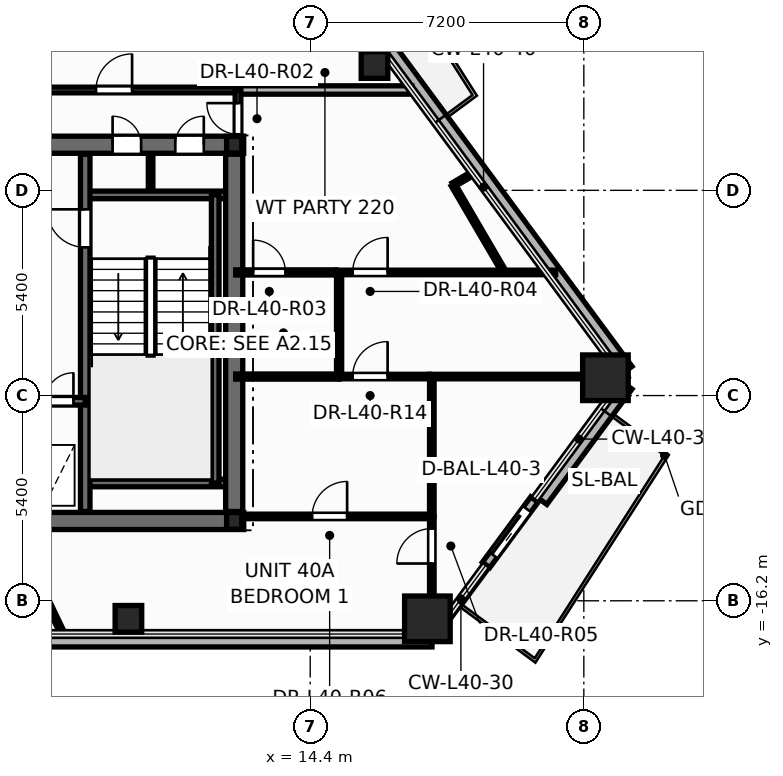
"""IFC4 building model, lengths in metres.
Left out: names, types, materials, properties, quantities, classifications, styles, units other than length and angle.
Written with IfcOpenShell. Run it as: python <this file> out.ifc"""

import sys

from ifc_helpers import new_model, si_unit, direction, frame, frame_2d, origin, origin_2d, place, context, subcontext, project, spatial, rectangle, hollow_rectangle, hollow_circle, i_section, extrude, element, fill, save


model = new_model("IFC4")
c1 = context("Model", 3, precision=1e-05, world=origin(), true_north=direction((0.0, 1.0)))
c2 = subcontext(c1, "Body", "Model", "MODEL_VIEW")
j1 = project(units=[si_unit("LENGTHUNIT", "METRE"), si_unit("PLANEANGLEUNIT", "RADIAN")], contexts=[c1])
p1 = place(None, origin())
s1 = spatial("IfcSite", under=j1, at=p1, CompositionType="ELEMENT")
p2 = place(p1, origin())
s2 = spatial("IfcBuilding", under=s1, at=p2, CompositionType="ELEMENT")
p3 = place(p2, frame((0.0, 0.0, 154.5)))
s3 = spatial("IfcBuildingStorey", under=s2, at=p3, CompositionType="ELEMENT", Elevation=154.5)
for number, where, z_axis, x_axis in (
    (1, (17.484, -16.674, 0.0), (0.0, 0.0, 1.0), (1.0, 0.0, 0.0)),
    (2, (22.168, -10.331, 0.0), (0.0, 0.0, 1.0), (1.0, 0.0, 0.0)),
):
    element("IfcColumn", number, at=place(p3, frame(where, z_axis=z_axis, x_axis=x_axis)), inside=s3, PredefinedType="COLUMN", context=c2, shape_type="SweptSolid", body=[
        extrude(hollow_rectangle(XDim=1.2, YDim=1.2, WallThickness=0.055, at=origin_2d()), origin(), (0.0, 0.0, 1.0), 3.6),
    ])
for number, where, z_axis, x_axis in (
    (3, (9.616, -16.674, 0.0), (0.0, 0.0, 1.0), (1.0, 0.0, 0.0)),
    (4, (16.092, -2.103, 0.0), (0.0, 0.0, 1.0), (1.0, 0.0, 0.0)),
):
    element("IfcColumn", number, at=place(p3, frame(where, z_axis=z_axis, x_axis=x_axis)), inside=s3, PredefinedType="COLUMN", context=c2, shape_type="SweptSolid", body=[
        extrude(hollow_circle(Radius=0.35, WallThickness=0.03, at=origin_2d()), origin(), (0.0, 0.0, 1.0), 3.6),
    ])
for number, where, z_axis, x_axis in (
    (5, (12.4, -14.1, 0.0), (0.0, 0.0, 1.0), (1.0, 0.0, 0.0)),
    (6, (12.4, -4.2, 0.0), (0.0, 0.0, 1.0), (1.0, 0.0, 0.0)),
):
    element("IfcColumn", number, at=place(p3, frame(where, z_axis=z_axis, x_axis=x_axis)), inside=s3, PredefinedType="COLUMN", context=c2, shape_type="SweptSolid", body=[
        extrude(i_section(OverallWidth=0.4, OverallDepth=0.44, WebThickness=0.028, FlangeThickness=0.04, at=origin_2d()), origin(), (0.0, 0.0, 1.0), 3.6),
    ])
p4 = place(p3, frame((-17.605, -17.234, -0.2), z_axis=(0.0, 0.0, 1.0), x_axis=(1.0, 0.0, 0.0)))
e7 = element("IfcWall", 7, at=p4, inside=s3, PredefinedType="PARAPET", context=c2, shape_type="SweptSolid", body=[
    extrude(rectangle(XDim=35.211, YDim=0.36, at=frame_2d((17.605, 0.0))), origin(), (0.0, 0.0, 1.0), 0.38),
])
p5 = place(p3, frame((20.482, -13.558, -0.2), z_axis=(0.0, 0.0, 1.0), x_axis=(0.59405075876, 0.804427557967, 0.0)))
e8 = element("IfcWall", 8, at=p5, inside=s3, PredefinedType="PARAPET", context=c2, shape_type="SweptSolid", body=[
    extrude(rectangle(XDim=3.773, YDim=0.36, at=frame_2d((1.886, 0.0))), origin(), (0.0, 0.0, 1.0), 0.38),
])
p6 = place(p3, frame((22.723, -10.14, -0.2), z_axis=(0.0, 0.0, 1.0), x_axis=(-0.59407502275, 0.804409639017, 0.0)))
e9 = element("IfcWall", 9, at=p6, inside=s3, PredefinedType="PARAPET", context=c2, shape_type="SweptSolid", body=[
    extrude(rectangle(XDim=12.23, YDim=0.36, at=frame_2d((6.115, 0.0))), origin(), (0.0, 0.0, 1.0), 0.38),
])
p7 = place(p3, frame((19.028, -15.256, -0.015), z_axis=(0.0, 0.0, 1.0), x_axis=(0.594124797079, 0.804372877151, 0.0)))
e10 = element("IfcWall", 10, at=p7, inside=s3, PredefinedType="STANDARD", context=c2, shape_type="SweptSolid", body=[
    extrude(rectangle(XDim=2.14, YDim=0.24, at=frame_2d((1.07, 0.0))), origin(), (0.0, 0.0, 1.0), 2.807),
])
p8 = place(p7, frame((0.32, 0.0, 0.015)))
e11 = element("IfcOpeningElement", 11, at=p8, cuts=e10, PredefinedType="OPENING", context=c2, shape_type="SweptSolid", body=[
    extrude(rectangle(XDim=1.506, YDim=2.204, at=frame_2d((0.75, 1.102))), frame((0.0, 0.13, 0.0), z_axis=(0.0, -1.0, 0.0), x_axis=(1.0, 0.0, 0.0)), (0.0, 0.0, 1.0), 0.26),
])
p9 = place(p3, frame((10.2, -5.52, 0.0), z_axis=(0.0, 0.0, 1.0), x_axis=(0.0, 1.0, 0.0)))
e12 = element("IfcWall", 12, at=p9, inside=s3, PredefinedType="PARTITIONING", context=c2, shape_type="SweptSolid", body=[
    extrude(rectangle(XDim=1.12, YDim=0.12, at=frame_2d((0.56, 0.0))), origin(), (0.0, 0.0, 1.0), 3.35),
])
p10 = place(p3, frame((-12.65, -14.1, 0.0), z_axis=(0.0, 0.0, 1.0), x_axis=(1.0, 0.0, 0.0)))
e13 = element("IfcWall", 13, at=p10, inside=s3, PredefinedType="SHEAR", context=c2, shape_type="SweptSolid", body=[
    extrude(rectangle(XDim=25.3, YDim=0.45, at=frame_2d((12.65, 0.0))), origin(), (0.0, 0.0, 1.0), 3.6),
])
p11 = place(p3, frame((-12.65, -4.2, 0.0), z_axis=(0.0, 0.0, 1.0), x_axis=(1.0, 0.0, 0.0)))
e14 = element("IfcWall", 14, at=p11, inside=s3, PredefinedType="SHEAR", context=c2, shape_type="SweptSolid", body=[
    extrude(rectangle(XDim=25.3, YDim=0.45, at=frame_2d((12.65, 0.0))), origin(), (0.0, 0.0, 1.0), 3.6),
])
p12 = place(p11, frame((1.85, 0.0, 0.0)))
e15 = element("IfcOpeningElement", 15, at=p12, cuts=e14, PredefinedType="OPENING", context=c2, shape_type="SweptSolid", body=[
    extrude(rectangle(XDim=0.756, YDim=2.054, at=frame_2d((0.375, 1.027))), frame((0.0, 0.235, 0.0), z_axis=(0.0, -1.0, 0.0), x_axis=(1.0, 0.0, 0.0)), (0.0, 0.0, 1.0), 0.47),
])
p13 = place(p11, frame((21.85, 0.0, 0.0)))
e16 = element("IfcOpeningElement", 16, at=p13, cuts=e14, PredefinedType="OPENING", context=c2, shape_type="SweptSolid", body=[
    extrude(rectangle(XDim=0.756, YDim=2.054, at=frame_2d((0.375, 1.027))), frame((0.0, 0.235, 0.0), z_axis=(0.0, -1.0, 0.0), x_axis=(1.0, 0.0, 0.0)), (0.0, 0.0, 1.0), 0.47),
])
p14 = place(p11, frame((23.5, 0.0, 0.0)))
e17 = element("IfcOpeningElement", 17, at=p14, cuts=e14, PredefinedType="OPENING", context=c2, shape_type="SweptSolid", body=[
    extrude(rectangle(XDim=0.756, YDim=2.054, at=frame_2d((0.375, 1.027))), frame((0.0, 0.235, 0.0), z_axis=(0.0, -1.0, 0.0), x_axis=(1.0, 0.0, 0.0)), (0.0, 0.0, 1.0), 0.47),
])
p15 = place(p11, frame((5.85, 0.0, 0.0)))
e18 = element("IfcOpeningElement", 18, at=p15, cuts=e14, PredefinedType="OPENING", context=c2, shape_type="SweptSolid", body=[
    extrude(rectangle(XDim=1.006, YDim=2.104, at=frame_2d((0.5, 1.052))), frame((0.0, 0.235, 0.0), z_axis=(0.0, -1.0, 0.0), x_axis=(1.0, 0.0, 0.0)), (0.0, 0.0, 1.0), 0.47),
])
p16 = place(p11, frame((10.35, 0.0, 0.0)))
e19 = element("IfcOpeningElement", 19, at=p16, cuts=e14, PredefinedType="OPENING", context=c2, shape_type="SweptSolid", body=[
    extrude(rectangle(XDim=1.406, YDim=2.154, at=frame_2d((0.7, 1.077))), frame((0.0, 0.235, 0.0), z_axis=(0.0, -1.0, 0.0), x_axis=(1.0, 0.0, 0.0)), (0.0, 0.0, 1.0), 0.47),
])
p17 = place(p11, frame((18.45, 0.0, 0.0)))
e20 = element("IfcOpeningElement", 20, at=p17, cuts=e14, PredefinedType="OPENING", context=c2, shape_type="SweptSolid", body=[
    extrude(rectangle(XDim=1.006, YDim=2.104, at=frame_2d((0.5, 1.052))), frame((0.0, 0.235, 0.0), z_axis=(0.0, -1.0, 0.0), x_axis=(1.0, 0.0, 0.0)), (0.0, 0.0, 1.0), 0.47),
])
for number, where, z_axis, x_axis in (
    (21, (8.48, -5.52, 0.0), (0.0, 0.0, 1.0), (1.0, 0.0, 0.0)),
    (22, (8.48, -13.1, 0.0), (0.0, 0.0, 1.0), (1.0, 0.0, 0.0)),
):
    element("IfcWall", number, at=place(p3, frame(where, z_axis=z_axis, x_axis=x_axis)), inside=s3, PredefinedType="SOLIDWALL", context=c2, shape_type="SweptSolid", body=[
        extrude(rectangle(XDim=3.87, YDim=0.2, at=frame_2d((1.935, 0.0))), origin(), (0.0, 0.0, 1.0), 3.6),
    ])
p18 = place(p3, frame((11.9, -13.1, 0.0), z_axis=(0.0, 0.0, 1.0), x_axis=(0.0, 1.0, 0.0)))
e23 = element("IfcWall", 23, at=p18, inside=s3, PredefinedType="SOLIDWALL", context=c2, shape_type="SweptSolid", body=[
    extrude(rectangle(XDim=7.58, YDim=0.2, at=frame_2d((3.79, 0.0))), origin(), (0.0, 0.0, 1.0), 3.6),
])
p19 = place(p3, frame((8.48, -13.85, 0.0), z_axis=(0.0, 0.0, 1.0), x_axis=(0.0, 1.0, 0.0)))
e24 = element("IfcWall", 24, at=p19, inside=s3, PredefinedType="SHEAR", context=c2, shape_type="SweptSolid", body=[
    extrude(rectangle(XDim=9.4, YDim=0.25, at=frame_2d((4.7, 0.0))), origin(), (0.0, 0.0, 1.0), 3.6),
])
p20 = place(p19, frame((6.95, 0.0, 0.0)))
e25 = element("IfcOpeningElement", 25, at=p20, cuts=e24, PredefinedType="OPENING", context=c2, shape_type="SweptSolid", body=[
    extrude(rectangle(XDim=1.006, YDim=2.104, at=frame_2d((0.5, 1.052))), frame((0.0, 0.135, 0.0), z_axis=(0.0, -1.0, 0.0), x_axis=(1.0, 0.0, 0.0)), (0.0, 0.0, 1.0), 0.27),
])
p21 = place(p3, frame((5.12, -10.95, 0.0), z_axis=(0.0, 0.0, 1.0), x_axis=(1.0, 0.0, 0.0)))
e26 = element("IfcWall", 26, at=p21, inside=s3, PredefinedType="SOLIDWALL", context=c2, shape_type="SweptSolid", body=[
    extrude(rectangle(XDim=3.36, YDim=0.2, at=frame_2d((1.68, 0.0))), origin(), (0.0, 0.0, 1.0), 3.6),
])
p22 = place(p21, frame((0.42, 0.0, 0.0)))
e27 = element("IfcOpeningElement", 27, at=p22, cuts=e26, PredefinedType="OPENING", context=c2, shape_type="SweptSolid", body=[
    extrude(rectangle(XDim=1.106, YDim=2.104, at=frame_2d((0.55, 1.052))), frame((0.0, 0.11, 0.0), z_axis=(0.0, -1.0, 0.0), x_axis=(1.0, 0.0, 0.0)), (0.0, 0.0, 1.0), 0.22),
])
p23 = place(p21, frame((2.3, 0.0, 0.0)))
e28 = element("IfcOpeningElement", 28, at=p23, cuts=e26, PredefinedType="OPENING", context=c2, shape_type="SweptSolid", body=[
    extrude(rectangle(XDim=0.756, YDim=2.054, at=frame_2d((0.375, 1.027))), frame((0.0, 0.11, 0.0), z_axis=(0.0, -1.0, 0.0), x_axis=(1.0, 0.0, 0.0)), (0.0, 0.0, 1.0), 0.22),
])
p24 = place(p3, frame((12.4, -13.85, 0.0), z_axis=(0.0, 0.0, 1.0), x_axis=(0.0, 1.0, 0.0)))
e29 = element("IfcWall", 29, at=p24, inside=s3, PredefinedType="SHEAR", context=c2, shape_type="SweptSolid", body=[
    extrude(rectangle(XDim=9.4, YDim=0.45, at=frame_2d((4.7, 0.0))), origin(), (0.0, 0.0, 1.0), 3.6),
])
p25 = place(p3, frame((5.1, -2.76, 0.0), z_axis=(0.0, 0.0, 1.0), x_axis=(1.0, 0.0, 0.0)))
e30 = element("IfcWall", 30, at=p25, inside=s3, PredefinedType="PARTITIONING", context=c2, shape_type="SweptSolid", body=[
    extrude(rectangle(XDim=7.4, YDim=0.15, at=frame_2d((3.7, 0.0))), origin(), (0.0, 0.0, 1.0), 2.325),
])
p26 = place(p25, frame((3.663, 0.0, 0.0)))
e31 = element("IfcOpeningElement", 31, at=p26, cuts=e30, PredefinedType="OPENING", context=c2, shape_type="SweptSolid", body=[
    extrude(rectangle(XDim=0.956, YDim=2.104, at=frame_2d((0.475, 1.052))), frame((0.0, 0.085, 0.0), z_axis=(0.0, -1.0, 0.0), x_axis=(1.0, 0.0, 0.0)), (0.0, 0.0, 1.0), 0.17),
])
p27 = place(p3, frame((15.08, -7.56, 0.0), z_axis=(0.0, 0.0, 1.0), x_axis=(1.0, 0.0, 0.0)))
e32 = element("IfcWall", 32, at=p27, inside=s3, PredefinedType="PARTITIONING", context=c2, shape_type="SweptSolid", body=[
    extrude(rectangle(XDim=5.78, YDim=0.12, at=frame_2d((2.89, 0.0))), origin(), (0.0, 0.0, 1.0), 2.325),
])
p28 = place(p27, frame((0.437, 0.0, 0.0)))
e33 = element("IfcOpeningElement", 33, at=p28, cuts=e32, PredefinedType="OPENING", context=c2, shape_type="SweptSolid", body=[
    extrude(rectangle(XDim=0.926, YDim=2.104, at=frame_2d((0.46, 1.052))), frame((0.0, 0.07, 0.0), z_axis=(0.0, -1.0, 0.0), x_axis=(1.0, 0.0, 0.0)), (0.0, 0.0, 1.0), 0.14),
])
p29 = place(p3, frame((12.652, -13.98, 0.0), z_axis=(0.0, 0.0, 1.0), x_axis=(1.0, 0.0, 0.0)))
e34 = element("IfcWall", 34, at=p29, inside=s3, PredefinedType="PARTITIONING", context=c2, shape_type="SweptSolid", body=[
    extrude(rectangle(XDim=4.948, YDim=0.12, at=frame_2d((2.474, 0.0))), origin(), (0.0, 0.0, 1.0), 3.35),
])
p30 = place(p29, frame((1.799, 0.0, 0.0)))
e35 = element("IfcOpeningElement", 35, at=p30, cuts=e34, PredefinedType="OPENING", context=c2, shape_type="SweptSolid", body=[
    extrude(rectangle(XDim=0.926, YDim=2.104, at=frame_2d((0.46, 1.052))), frame((0.0, 0.07, 0.0), z_axis=(0.0, -1.0, 0.0), x_axis=(1.0, 0.0, 0.0)), (0.0, 0.0, 1.0), 0.14),
])
p31 = place(p3, frame((17.54, -10.3, 0.0), z_axis=(0.0, 0.0, 1.0), x_axis=(1.0, 0.0, 0.0)))
e36 = element("IfcWall", 36, at=p31, inside=s3, PredefinedType="PARTITIONING", context=c2, shape_type="SweptSolid", body=[
    extrude(rectangle(XDim=5.103, YDim=0.12, at=frame_2d((2.551, 0.0))), origin(), (0.0, 0.0, 1.0), 2.325),
])
p32 = place(p3, frame((12.5, -2.76, 0.0), z_axis=(0.0, 0.0, 1.0), x_axis=(1.0, 0.0, 0.0)))
e37 = element("IfcWall", 37, at=p32, inside=s3, PredefinedType="PARTITIONING", context=c2, shape_type="SweptSolid", body=[
    extrude(rectangle(XDim=4.574, YDim=0.22, at=frame_2d((2.287, 0.0))), origin(), (0.0, 0.0, 1.0), 2.792),
])
p33 = place(p3, frame((17.6, -13.98, 0.0), z_axis=(0.0, 0.0, 1.0), x_axis=(0.0, 1.0, 0.0)))
e38 = element("IfcWall", 38, at=p33, inside=s3, PredefinedType="PARTITIONING", context=c2, shape_type="SweptSolid", body=[
    extrude(rectangle(XDim=3.68, YDim=0.12, at=frame_2d((1.84, 0.0))), origin(), (0.0, 0.0, 1.0), 3.35),
])
p34 = place(p3, frame((17.6, -17.074, 0.0), z_axis=(0.0, 0.0, 1.0), x_axis=(0.0, 1.0, 0.0)))
e39 = element("IfcWall", 39, at=p34, inside=s3, PredefinedType="PARTITIONING", context=c2, shape_type="SweptSolid", body=[
    extrude(rectangle(XDim=3.094, YDim=0.12, at=frame_2d((1.547, 0.0))), origin(), (0.0, 0.0, 1.0), 2.325),
])
p35 = place(p34, frame((1.855, 0.0, 0.0)))
e40 = element("IfcOpeningElement", 40, at=p35, cuts=e39, PredefinedType="OPENING", context=c2, shape_type="SweptSolid", body=[
    extrude(rectangle(XDim=0.926, YDim=2.104, at=frame_2d((0.46, 1.052))), frame((0.0, 0.07, 0.0), z_axis=(0.0, -1.0, 0.0), x_axis=(1.0, 0.0, 0.0)), (0.0, 0.0, 1.0), 0.14),
])
p36 = place(p3, frame((12.44, -7.56, 0.0), z_axis=(0.0, 0.0, 1.0), x_axis=(1.0, 0.0, 0.0)))
e41 = element("IfcWall", 41, at=p36, inside=s3, PredefinedType="PARTITIONING", context=c2, shape_type="SweptSolid", body=[
    extrude(rectangle(XDim=2.638, YDim=0.135, at=frame_2d((1.319, 0.0))), origin(), (0.0, 0.0, 1.0), 2.792),
])
p37 = place(p36, frame((0.458, 0.0, 0.0)))
e42 = element("IfcOpeningElement", 42, at=p37, cuts=e41, PredefinedType="OPENING", context=c2, shape_type="SweptSolid", body=[
    extrude(rectangle(XDim=0.856, YDim=2.104, at=frame_2d((0.425, 1.052))), frame((0.0, 0.078, 0.0), z_axis=(0.0, -1.0, 0.0), x_axis=(1.0, 0.0, 0.0)), (0.0, 0.0, 1.0), 0.155),
])
p38 = place(p3, frame((15.16, -10.3, 0.0), z_axis=(0.0, 0.0, 1.0), x_axis=(0.0, 1.0, 0.0)))
e43 = element("IfcWall", 43, at=p38, inside=s3, PredefinedType="PARTITIONING", context=c2, shape_type="SweptSolid", body=[
    extrude(rectangle(XDim=2.74, YDim=0.135, at=frame_2d((1.37, 0.0))), origin(), (0.0, 0.0, 1.0), 3.35),
])
p39 = place(p3, frame((12.44, -10.3, 0.0), z_axis=(0.0, 0.0, 1.0), x_axis=(1.0, 0.0, 0.0)))
e44 = element("IfcWall", 44, at=p39, inside=s3, PredefinedType="PARTITIONING", context=c2, shape_type="SweptSolid", body=[
    extrude(rectangle(XDim=2.72, YDim=0.135, at=frame_2d((1.36, 0.0))), origin(), (0.0, 0.0, 1.0), 2.792),
])
p40 = place(p3, frame((15.16, -10.3, 0.0), z_axis=(0.0, 0.0, 1.0), x_axis=(1.0, 0.0, 0.0)))
e45 = element("IfcWall", 45, at=p40, inside=s3, PredefinedType="PARTITIONING", context=c2, shape_type="SweptSolid", body=[
    extrude(rectangle(XDim=2.378, YDim=0.12, at=frame_2d((1.189, 0.0))), origin(), (0.0, 0.0, 1.0), 3.35),
])
p41 = place(p40, frame((0.356, 0.0, 0.0)))
e46 = element("IfcOpeningElement", 46, at=p41, cuts=e45, PredefinedType="OPENING", context=c2, shape_type="SweptSolid", body=[
    extrude(rectangle(XDim=0.926, YDim=2.104, at=frame_2d((0.46, 1.052))), frame((0.0, 0.07, 0.0), z_axis=(0.0, -1.0, 0.0), x_axis=(1.0, 0.0, 0.0)), (0.0, 0.0, 1.0), 0.14),
])
p42 = place(p3, frame((19.457, -7.471, 0.0), z_axis=(0.0, 0.0, 1.0), x_axis=(-0.504681313398, 0.863305723314, 0.0)))
e47 = element("IfcWall", 47, at=p42, inside=s3, PredefinedType="PARTITIONING", context=c2, shape_type="SweptSolid", body=[
    extrude(rectangle(XDim=2.566, YDim=0.12, at=frame_2d((1.283, 0.0))), origin(), (0.0, 0.0, 1.0), 3.35),
])
p43 = place(p3, frame((12.5, -4.24, 0.0), z_axis=(0.0, 0.0, 1.0), x_axis=(0.0, 1.0, 0.0)))
e48 = element("IfcWall", 48, at=p43, inside=s3, PredefinedType="PARTITIONING", context=c2, shape_type="SweptSolid", body=[
    extrude(rectangle(XDim=1.48, YDim=0.15, at=frame_2d((0.74, 0.0))), origin(), (0.0, 0.0, 1.0), 2.325),
])
p44 = place(p43, frame((0.315, 0.0, 0.0)))
e49 = element("IfcOpeningElement", 49, at=p44, cuts=e48, PredefinedType="OPENING", context=c2, shape_type="SweptSolid", body=[
    extrude(rectangle(XDim=0.826, YDim=2.104, at=frame_2d((0.41, 1.052))), frame((0.0, 0.085, 0.0), z_axis=(0.0, -1.0, 0.0), x_axis=(1.0, 0.0, 0.0)), (0.0, 0.0, 1.0), 0.17),
])
p45 = place(p3, frame((7.48, -16.221, 0.0), z_axis=(0.0, 0.0, 1.0), x_axis=(0.432721607122, -0.901527598429, 0.0)))
e50 = element("IfcWall", 50, at=p45, inside=s3, PredefinedType="PARTITIONING", context=c2, shape_type="SweptSolid", body=[
    extrude(rectangle(XDim=0.839, YDim=0.12, at=frame_2d((0.419, 0.0))), origin(), (0.0, 0.0, 1.0), 2.792),
])
p46 = place(p3, frame((18.162, -5.256, 0.0), z_axis=(0.0, 0.0, 1.0), x_axis=(0.863277740544, 0.504729177561, 0.0)))
e51 = element("IfcWall", 51, at=p46, inside=s3, PredefinedType="PARTITIONING", context=c2, shape_type="SweptSolid", body=[
    extrude(rectangle(XDim=0.601, YDim=0.12, at=frame_2d((0.301, 0.0))), origin(), (0.0, 0.0, 1.0), 2.792),
])
p47 = place(p8, origin())
e52 = element("IfcDoor", 52, at=p47, inside=s3, OperationType="SLIDING_TO_RIGHT", PredefinedType="DOOR", context=c2, shape_type="SweptSolid", body=[
    extrude(rectangle(XDim=1.5, YDim=2.2, at=frame_2d((0.75, 1.1))), frame((0.0, 0.025, 0.0), z_axis=(0.0, -1.0, 0.0), x_axis=(1.0, 0.0, 0.0)), (0.0, 0.0, 1.0), 0.05),
])
fill(e11, e52)
p48 = place(p20, origin())
e53 = element("IfcDoor", 53, at=p48, inside=s3, OperationType="SINGLE_SWING_RIGHT", PredefinedType="DOOR", context=c2, shape_type="SweptSolid", body=[
    extrude(rectangle(XDim=1.0, YDim=2.1, at=frame_2d((0.5, 1.05))), frame((0.0, 0.025, 0.0), z_axis=(0.0, -1.0, 0.0), x_axis=(1.0, 0.0, 0.0)), (0.0, 0.0, 1.0), 0.05),
])
fill(e25, e53)
p49 = place(p23, origin())
e54 = element("IfcDoor", 54, at=p49, inside=s3, OperationType="SINGLE_SWING_RIGHT", PredefinedType="DOOR", context=c2, shape_type="SweptSolid", body=[
    extrude(rectangle(XDim=0.75, YDim=2.05, at=frame_2d((0.375, 1.025))), frame((0.0, 0.025, 0.0), z_axis=(0.0, -1.0, 0.0), x_axis=(1.0, 0.0, 0.0)), (0.0, 0.0, 1.0), 0.05),
])
fill(e28, e54)
p50 = place(p13, origin())
e55 = element("IfcDoor", 55, at=p50, inside=s3, OperationType="SINGLE_SWING_LEFT", PredefinedType="DOOR", context=c2, shape_type="SweptSolid", body=[
    extrude(rectangle(XDim=0.75, YDim=2.05, at=frame_2d((0.375, 1.025))), frame((0.0, 0.025, 0.0), z_axis=(0.0, -1.0, 0.0), x_axis=(1.0, 0.0, 0.0)), (0.0, 0.0, 1.0), 0.05),
])
fill(e16, e55)
p51 = place(p14, origin())
e56 = element("IfcDoor", 56, at=p51, inside=s3, OperationType="SINGLE_SWING_RIGHT", PredefinedType="DOOR", context=c2, shape_type="SweptSolid", body=[
    extrude(rectangle(XDim=0.75, YDim=2.05, at=frame_2d((0.375, 1.025))), frame((0.0, 0.025, 0.0), z_axis=(0.0, -1.0, 0.0), x_axis=(1.0, 0.0, 0.0)), (0.0, 0.0, 1.0), 0.05),
])
fill(e17, e56)
p52 = place(p44, origin())
e57 = element("IfcDoor", 57, at=p52, inside=s3, OperationType="SINGLE_SWING_RIGHT", PredefinedType="DOOR", context=c2, shape_type="SweptSolid", body=[
    extrude(rectangle(XDim=0.82, YDim=2.1, at=frame_2d((0.41, 1.05))), frame((0.0, 0.025, 0.0), z_axis=(0.0, -1.0, 0.0), x_axis=(1.0, 0.0, 0.0)), (0.0, 0.0, 1.0), 0.05),
])
fill(e49, e57)
p53 = place(p37, origin())
e58 = element("IfcDoor", 58, at=p53, inside=s3, OperationType="SINGLE_SWING_LEFT", PredefinedType="DOOR", context=c2, shape_type="SweptSolid", body=[
    extrude(rectangle(XDim=0.85, YDim=2.1, at=frame_2d((0.425, 1.05))), frame((0.0, 0.025, 0.0), z_axis=(0.0, -1.0, 0.0), x_axis=(1.0, 0.0, 0.0)), (0.0, 0.0, 1.0), 0.05),
])
fill(e42, e58)
p54 = place(p28, origin())
e59 = element("IfcDoor", 59, at=p54, inside=s3, OperationType="SINGLE_SWING_RIGHT", PredefinedType="DOOR", context=c2, shape_type="SweptSolid", body=[
    extrude(rectangle(XDim=0.92, YDim=2.1, at=frame_2d((0.46, 1.05))), frame((0.0, 0.025, 0.0), z_axis=(0.0, -1.0, 0.0), x_axis=(1.0, 0.0, 0.0)), (0.0, 0.0, 1.0), 0.05),
])
fill(e33, e59)
p55 = place(p35, origin())
e60 = element("IfcDoor", 60, at=p55, inside=s3, OperationType="SINGLE_SWING_LEFT", PredefinedType="DOOR", context=c2, shape_type="SweptSolid", body=[
    extrude(rectangle(XDim=0.92, YDim=2.1, at=frame_2d((0.46, 1.05))), frame((0.0, 0.025, 0.0), z_axis=(0.0, -1.0, 0.0), x_axis=(1.0, 0.0, 0.0)), (0.0, 0.0, 1.0), 0.05),
])
fill(e40, e60)
p56 = place(p30, origin())
e61 = element("IfcDoor", 61, at=p56, inside=s3, OperationType="SINGLE_SWING_RIGHT", PredefinedType="DOOR", context=c2, shape_type="SweptSolid", body=[
    extrude(rectangle(XDim=0.92, YDim=2.1, at=frame_2d((0.46, 1.05))), frame((0.0, 0.025, 0.0), z_axis=(0.0, -1.0, 0.0), x_axis=(1.0, 0.0, 0.0)), (0.0, 0.0, 1.0), 0.05),
])
fill(e35, e61)
p57 = place(p26, origin())
e62 = element("IfcDoor", 62, at=p57, inside=s3, OperationType="SINGLE_SWING_RIGHT", PredefinedType="DOOR", context=c2, shape_type="SweptSolid", body=[
    extrude(rectangle(XDim=0.95, YDim=2.1, at=frame_2d((0.475, 1.05))), frame((0.0, 0.025, 0.0), z_axis=(0.0, -1.0, 0.0), x_axis=(1.0, 0.0, 0.0)), (0.0, 0.0, 1.0), 0.05),
])
fill(e31, e62)
p58 = place(p41, origin())
e63 = element("IfcDoor", 63, at=p58, inside=s3, OperationType="SINGLE_SWING_RIGHT", PredefinedType="DOOR", context=c2, shape_type="SweptSolid", body=[
    extrude(rectangle(XDim=0.92, YDim=2.1, at=frame_2d((0.46, 1.05))), frame((0.0, 0.025, 0.0), z_axis=(0.0, -1.0, 0.0), x_axis=(1.0, 0.0, 0.0)), (0.0, 0.0, 1.0), 0.05),
])
fill(e46, e63)
save(model, sys.argv[1])
